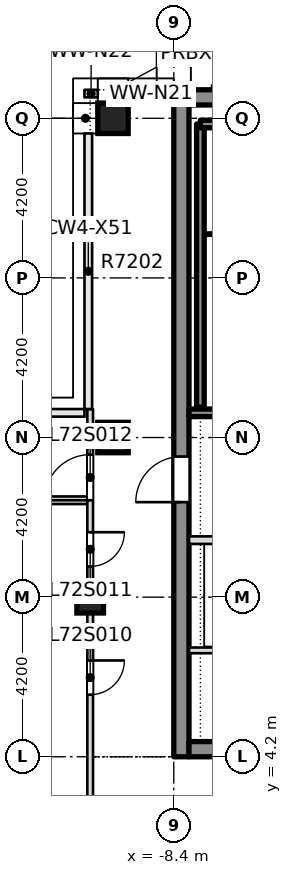
"""IFC4 building model, lengths in metres.
Left out: names, types, materials, properties, quantities, classifications, styles, units other than length and angle.
Written with IfcOpenShell. Run it as: python <this file> out.ifc"""

import sys

from ifc_helpers import new_model, si_unit, direction, frame, frame_2d, origin, origin_2d, place, context, subcontext, project, spatial, rectangle, extrude, element, fill, save


model = new_model("IFC4")
c1 = context("Model", 3, precision=1e-05, world=origin(), true_north=direction((0.0, 1.0)))
c2 = subcontext(c1, "Body", "Model", "MODEL_VIEW")
j1 = project(units=[si_unit("LENGTHUNIT", "METRE"), si_unit("PLANEANGLEUNIT", "RADIAN")], contexts=[c1])
p1 = place(None, origin())
s1 = spatial("IfcSite", under=j1, at=p1, CompositionType="ELEMENT")
p2 = place(p1, origin())
s2 = spatial("IfcBuilding", under=s1, at=p2, CompositionType="ELEMENT")
p3 = place(p2, frame((0.0, 0.0, 273.85)))
s3 = spatial("IfcBuildingStorey", under=s2, at=p3, CompositionType="ELEMENT", Elevation=273.85)
p4 = place(p3, frame((-8.2, 4.2, -0.5), z_axis=(0.0, 0.0, 1.0), x_axis=(0.0, 1.0, 0.0)))
e1 = element("IfcWall", 1, at=p4, inside=s3, PredefinedType="SHEAR", context=c2, shape_type="SweptSolid", body=[
    extrude(rectangle(XDim=17.55, YDim=0.4, at=frame_2d((8.775, 0.0))), origin(), (0.0, 0.0, 1.0), 4.5),
])
p5 = place(p4, frame((6.7, 0.0, 0.5)))
e2 = element("IfcOpeningElement", 2, at=p5, cuts=e1, PredefinedType="OPENING", context=c2, shape_type="SweptSolid", body=[
    extrude(rectangle(XDim=1.2, YDim=2.1, at=frame_2d((0.6, 1.05))), frame((0.0, 0.21, 0.0), z_axis=(0.0, -1.0, 0.0), x_axis=(1.0, 0.0, 0.0)), (0.0, 0.0, 1.0), 0.42),
])
for number, where, z_axis, x_axis in (
    (3, (-8.0, 4.4, -0.5), (0.0, 0.0, 1.0), (1.0, 0.0, 0.0)),
    (4, (-8.0, 21.55, -0.5), (0.0, 0.0, 1.0), (1.0, 0.0, 0.0)),
):
    element("IfcWall", number, at=place(p3, frame(where, z_axis=z_axis, x_axis=x_axis)), inside=s3, PredefinedType="SHEAR", context=c2, shape_type="SweptSolid", body=[
        extrude(rectangle(XDim=16.0, YDim=0.4, at=frame_2d((8.0, 0.0))), origin(), (0.0, 0.0, 1.0), 4.5),
    ])
for number, where, z_axis, x_axis in (
    (5, (-10.0, 12.6, -0.5), (0.0, 0.0, 1.0), (1.0, 0.0, 0.0)),
    (6, (-10.0, 21.0, -0.5), (0.0, 0.0, 1.0), (1.0, 0.0, 0.0)),
):
    element("IfcColumn", number, at=place(p3, frame(where, z_axis=z_axis, x_axis=x_axis)), inside=s3, PredefinedType="COLUMN", context=c2, shape_type="SweptSolid", body=[
        extrude(rectangle(XDim=0.8, YDim=0.8, at=origin_2d()), origin(), (0.0, 0.0, 1.0), 4.5),
    ])
p6 = place(p3, frame((-10.6, 8.333, -0.5), z_axis=(0.0, 0.0, 1.0), x_axis=(1.0, 0.0, 0.0)))
e7 = element("IfcColumn", 7, at=p6, inside=s3, PredefinedType="COLUMN", context=c2, shape_type="SweptSolid", body=[
    extrude(rectangle(XDim=0.7, YDim=0.7, at=origin_2d()), origin(), (0.0, 0.0, 1.0), 5.0),
])
for number, where, z_axis, x_axis in (
    (8, (-21.55, 8.368, 0.0), (0.0, 0.0, 1.0), (1.0, 0.0, 0.0)),
    (9, (-21.55, 10.95, 0.0), (0.0, 0.0, 1.0), (1.0, 0.0, 0.0)),
):
    element("IfcWall", number, at=place(p3, frame(where, z_axis=z_axis, x_axis=x_axis)), inside=s3, PredefinedType="PARTITIONING", context=c2, shape_type="SweptSolid", body=[
        extrude(rectangle(XDim=10.875, YDim=0.2, at=frame_2d((5.438, 0.0))), origin(), (0.0, 0.0, 1.0), 4.0),
    ])
p7 = place(p3, frame((-10.6, 2.075, 0.0), z_axis=(0.0, 0.0, 1.0), x_axis=(0.0, 1.0, 0.0)))
e10 = element("IfcWall", 10, at=p7, inside=s3, PredefinedType="PARTITIONING", context=c2, shape_type="SweptSolid", body=[
    extrude(rectangle(XDim=11.275, YDim=0.15, at=frame_2d((5.638, 0.0))), origin(), (0.0, 0.0, 1.0), 4.0),
])
p8 = place(p7, frame((3.759, 0.0, 0.0)))
e11 = element("IfcOpeningElement", 11, at=p8, cuts=e10, PredefinedType="OPENING", context=c2, shape_type="SweptSolid", body=[
    extrude(rectangle(XDim=0.9, YDim=2.1, at=frame_2d((0.45, 1.05))), frame((0.0, 0.085, 0.0), z_axis=(0.0, -1.0, 0.0), x_axis=(1.0, 0.0, 0.0)), (0.0, 0.0, 1.0), 0.17),
])
p9 = place(p7, frame((7.134, 0.0, 0.0)))
e12 = element("IfcOpeningElement", 12, at=p9, cuts=e10, PredefinedType="OPENING", context=c2, shape_type="SweptSolid", body=[
    extrude(rectangle(XDim=0.9, YDim=2.1, at=frame_2d((0.45, 1.05))), frame((0.0, 0.085, 0.0), z_axis=(0.0, -1.0, 0.0), x_axis=(1.0, 0.0, 0.0)), (0.0, 0.0, 1.0), 0.17),
])
p10 = place(p7, frame((8.875, 0.0, 0.0)))
e13 = element("IfcOpeningElement", 13, at=p10, cuts=e10, PredefinedType="OPENING", context=c2, shape_type="SweptSolid", body=[
    extrude(rectangle(XDim=1.2, YDim=2.1, at=frame_2d((0.6, 1.05))), frame((0.0, 0.085, 0.0), z_axis=(0.0, -1.0, 0.0), x_axis=(1.0, 0.0, 0.0)), (0.0, 0.0, 1.0), 0.17),
])
p11 = place(p3, frame((-8.4, 21.65, 0.0), z_axis=(0.0, 0.0, 1.0), x_axis=(-1.0, 0.0, 0.0)))
e14 = element("IfcWall", 14, at=p11, inside=s3, PredefinedType="STANDARD", context=c2, shape_type="SweptSolid", body=[
    extrude(rectangle(XDim=1.2, YDim=0.2, at=frame_2d((0.6, 0.0))), origin(), (0.0, 0.0, 1.0), 4.0),
])
p12 = place(p3, frame((-10.4, 21.65, 0.0), z_axis=(0.0, 0.0, 1.0), x_axis=(-1.0, 0.0, 0.0)))
e15 = element("IfcWall", 15, at=p12, inside=s3, PredefinedType="STANDARD", context=c2, shape_type="SweptSolid", body=[
    extrude(rectangle(XDim=0.35, YDim=0.2, at=frame_2d((0.175, 0.0))), origin(), (0.0, 0.0, 1.0), 4.0),
])
p13 = place(p3, frame((-7.999, 7.0, 0.0), z_axis=(0.0, 0.0, 1.0), x_axis=(1.0, 0.0, 0.0)))
e16 = element("IfcWall", 16, at=p13, inside=s3, PredefinedType="PARTITIONING", context=c2, shape_type="SweptSolid", body=[
    extrude(rectangle(XDim=15.998, YDim=0.15, at=frame_2d((7.999, 0.0))), origin(), (0.0, 0.0, 1.0), 4.0),
])
p14 = place(p13, frame((7.299, 0.0, 0.0)))
e17 = element("IfcOpeningElement", 17, at=p14, cuts=e16, PredefinedType="OPENING", context=c2, shape_type="SweptSolid", body=[
    extrude(rectangle(XDim=1.4, YDim=2.1, at=frame_2d((0.7, 1.05))), frame((0.0, 0.085, 0.0), z_axis=(0.0, -1.0, 0.0), x_axis=(1.0, 0.0, 0.0)), (0.0, 0.0, 1.0), 0.17),
])
p15 = place(p3, frame((-7.999, 9.9, 0.0), z_axis=(0.0, 0.0, 1.0), x_axis=(1.0, 0.0, 0.0)))
e18 = element("IfcWall", 18, at=p15, inside=s3, PredefinedType="PARTITIONING", context=c2, shape_type="SweptSolid", body=[
    extrude(rectangle(XDim=4.399, YDim=0.2, at=frame_2d((2.199, 0.0))), origin(), (0.0, 0.0, 1.0), 4.0),
])
p16 = place(p15, frame((1.049, 0.0, 0.0)))
e19 = element("IfcOpeningElement", 19, at=p16, cuts=e18, PredefinedType="OPENING", context=c2, shape_type="SweptSolid", body=[
    extrude(rectangle(XDim=1.1, YDim=2.1, at=frame_2d((0.55, 1.05))), frame((0.0, 0.11, 0.0), z_axis=(0.0, -1.0, 0.0), x_axis=(1.0, 0.0, 0.0)), (0.0, 0.0, 1.0), 0.22),
])
p17 = place(p3, frame((-7.999, 13.25, 0.0), z_axis=(0.0, 0.0, 1.0), x_axis=(1.0, 0.0, 0.0)))
e20 = element("IfcWall", 20, at=p17, inside=s3, PredefinedType="SOLIDWALL", context=c2, shape_type="SweptSolid", body=[
    extrude(rectangle(XDim=4.574, YDim=0.2, at=frame_2d((2.287, 0.0))), origin(), (0.0, 0.0, 1.0), 4.0),
])
p18 = place(p17, frame((1.549, 0.0, 0.0)))
e21 = element("IfcOpeningElement", 21, at=p18, cuts=e20, PredefinedType="OPENING", context=c2, shape_type="SweptSolid", body=[
    extrude(rectangle(XDim=1.2, YDim=2.1, at=frame_2d((0.6, 1.05))), frame((0.0, 0.11, 0.0), z_axis=(0.0, -1.0, 0.0), x_axis=(1.0, 0.0, 0.0)), (0.0, 0.0, 1.0), 0.22),
])
p19 = place(p3, frame((-7.7, 13.4, 0.0), z_axis=(0.0, 0.0, 1.0), x_axis=(0.0, 1.0, 0.0)))
e22 = element("IfcWall", 22, at=p19, inside=s3, PredefinedType="SOLIDWALL", context=c2, shape_type="SweptSolid", body=[
    extrude(rectangle(XDim=7.45, YDim=0.2, at=frame_2d((3.725, 0.0))), origin(), (0.0, 0.0, 1.0), 4.0),
])
p20 = place(p3, frame((-7.7, 20.85, 0.0), z_axis=(0.0, 0.0, 1.0), x_axis=(1.0, 0.0, 0.0)))
e23 = element("IfcWall", 23, at=p20, inside=s3, PredefinedType="SOLIDWALL", context=c2, shape_type="SweptSolid", body=[
    extrude(rectangle(XDim=3.55, YDim=0.2, at=frame_2d((1.775, 0.0))), origin(), (0.0, 0.0, 1.0), 4.0),
])
p21 = place(p8, origin())
e24 = element("IfcDoor", 24, at=p21, inside=s3, OperationType="SINGLE_SWING_LEFT", PredefinedType="DOOR", context=c2, shape_type="SweptSolid", body=[
    extrude(rectangle(XDim=0.9, YDim=2.1, at=frame_2d((0.45, 1.05))), frame((0.0, 0.025, 0.0), z_axis=(0.0, -1.0, 0.0), x_axis=(1.0, 0.0, 0.0)), (0.0, 0.0, 1.0), 0.05),
])
fill(e11, e24)
p22 = place(p9, origin())
e25 = element("IfcDoor", 25, at=p22, inside=s3, OperationType="SINGLE_SWING_LEFT", PredefinedType="DOOR", context=c2, shape_type="SweptSolid", body=[
    extrude(rectangle(XDim=0.9, YDim=2.1, at=frame_2d((0.45, 1.05))), frame((0.0, 0.025, 0.0), z_axis=(0.0, -1.0, 0.0), x_axis=(1.0, 0.0, 0.0)), (0.0, 0.0, 1.0), 0.05),
])
fill(e12, e25)
p23 = place(p10, origin())
e26 = element("IfcDoor", 26, at=p23, inside=s3, OperationType="SINGLE_SWING_RIGHT", PredefinedType="DOOR", context=c2, shape_type="SweptSolid", body=[
    extrude(rectangle(XDim=1.2, YDim=2.1, at=frame_2d((0.6, 1.05))), frame((0.0, 0.025, 0.0), z_axis=(0.0, -1.0, 0.0), x_axis=(1.0, 0.0, 0.0)), (0.0, 0.0, 1.0), 0.05),
])
fill(e13, e26)
p24 = place(p5, origin())
e27 = element("IfcDoor", 27, at=p24, inside=s3, OperationType="SINGLE_SWING_LEFT", PredefinedType="DOOR", context=c2, shape_type="SweptSolid", body=[
    extrude(rectangle(XDim=1.2, YDim=2.1, at=frame_2d((0.6, 1.05))), frame((0.0, 0.025, 0.0), z_axis=(0.0, -1.0, 0.0), x_axis=(1.0, 0.0, 0.0)), (0.0, 0.0, 1.0), 0.05),
])
fill(e2, e27)
save(model, sys.argv[1])
